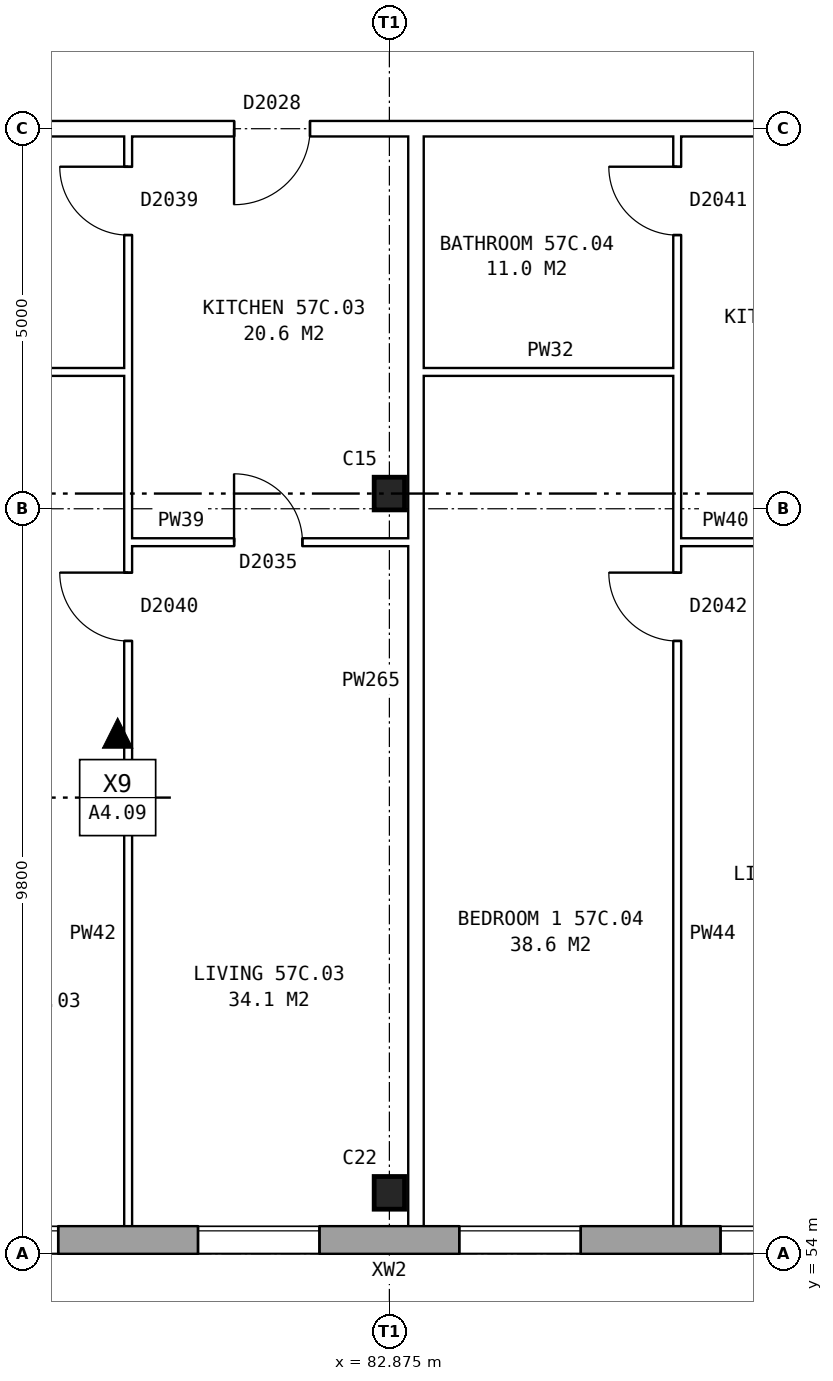
"""IFC4 building model, lengths in metres.
Left out: names, types, materials, properties, quantities, classifications, styles, units other than length and angle.
Written with IfcOpenShell. Run it as: python <this file> out.ifc"""

import sys

from ifc_helpers import new_model, si_unit, direction, frame, frame_2d, origin, origin_2d, place, context, subcontext, project, spatial, rectangle, i_section, extrude, element, fill, save


model = new_model("IFC4")
c1 = context("Model", 3, precision=1e-05, world=origin(), true_north=direction((0.0, 1.0)))
c2 = subcontext(c1, "Body", "Model", "MODEL_VIEW")
j1 = project(units=[si_unit("LENGTHUNIT", "METRE"), si_unit("PLANEANGLEUNIT", "RADIAN")], contexts=[c1])
p1 = place(None, origin())
s1 = spatial("IfcSite", under=j1, at=p1, CompositionType="ELEMENT")
p2 = place(p1, origin())
s2 = spatial("IfcBuilding", under=s1, at=p2, CompositionType="ELEMENT")
p3 = place(p2, frame((0.0, 0.0, 202.8)))
s3 = spatial("IfcBuildingStorey", under=s2, at=p3, CompositionType="ELEMENT", Elevation=202.8)
for number, where, z_axis, x_axis in (
    (1, (82.875, 54.8, 0.0), (0.0, 0.0, 1.0), (1.0, 0.0, 0.0)),
    (2, (82.875, 64.0, 0.0), (0.0, 0.0, 1.0), (1.0, 0.0, 0.0)),
):
    element("IfcColumn", number, at=place(p3, frame(where, z_axis=z_axis, x_axis=x_axis)), inside=s3, PredefinedType="COLUMN", context=c2, shape_type="SweptSolid", body=[
        extrude(i_section(OverallWidth=0.4, OverallDepth=0.43, WebThickness=0.04, FlangeThickness=0.04, at=origin_2d()), origin(), (0.0, 0.0, 1.0), 2.85),
    ])
p4 = place(p3, frame((75.95, 54.18, 0.0), z_axis=(0.0, 0.0, 1.0), x_axis=(1.0, 0.0, 0.0)))
e3 = element("IfcWall", 3, at=p4, inside=s3, PredefinedType="STANDARD", context=c2, shape_type="SweptSolid", body=[
    extrude(rectangle(XDim=55.1, YDim=0.36, at=frame_2d((27.55, 0.0))), origin(), (0.0, 0.0, 1.0), 2.85),
])
p5 = place(p4, frame((0.969, 0.0, 0.8)))
e4 = element("IfcOpeningElement", 4, at=p5, cuts=e3, PredefinedType="OPENING", context=c2, shape_type="SweptSolid", body=[
    extrude(rectangle(XDim=1.6, YDim=1.8, at=frame_2d((0.8, 0.9))), frame((0.0, 0.19, 0.0), z_axis=(0.0, -1.0, 0.0), x_axis=(1.0, 0.0, 0.0)), (0.0, 0.0, 1.0), 0.38),
])
p6 = place(p4, frame((4.406, 0.0, 0.8)))
e5 = element("IfcOpeningElement", 5, at=p6, cuts=e3, PredefinedType="OPENING", context=c2, shape_type="SweptSolid", body=[
    extrude(rectangle(XDim=1.6, YDim=1.8, at=frame_2d((0.8, 0.9))), frame((0.0, 0.19, 0.0), z_axis=(0.0, -1.0, 0.0), x_axis=(1.0, 0.0, 0.0)), (0.0, 0.0, 1.0), 0.38),
])
p7 = place(p4, frame((7.844, 0.0, 0.8)))
e6 = element("IfcOpeningElement", 6, at=p7, cuts=e3, PredefinedType="OPENING", context=c2, shape_type="SweptSolid", body=[
    extrude(rectangle(XDim=1.6, YDim=1.8, at=frame_2d((0.8, 0.9))), frame((0.0, 0.19, 0.0), z_axis=(0.0, -1.0, 0.0), x_axis=(1.0, 0.0, 0.0)), (0.0, 0.0, 1.0), 0.38),
])
p8 = place(p4, frame((11.281, 0.0, 0.8)))
e7 = element("IfcOpeningElement", 7, at=p8, cuts=e3, PredefinedType="OPENING", context=c2, shape_type="SweptSolid", body=[
    extrude(rectangle(XDim=1.6, YDim=1.8, at=frame_2d((0.8, 0.9))), frame((0.0, 0.19, 0.0), z_axis=(0.0, -1.0, 0.0), x_axis=(1.0, 0.0, 0.0)), (0.0, 0.0, 1.0), 0.38),
])
p9 = place(p4, frame((14.719, 0.0, 0.8)))
e8 = element("IfcOpeningElement", 8, at=p9, cuts=e3, PredefinedType="OPENING", context=c2, shape_type="SweptSolid", body=[
    extrude(rectangle(XDim=1.6, YDim=1.8, at=frame_2d((0.8, 0.9))), frame((0.0, 0.19, 0.0), z_axis=(0.0, -1.0, 0.0), x_axis=(1.0, 0.0, 0.0)), (0.0, 0.0, 1.0), 0.38),
])
p10 = place(p4, frame((18.156, 0.0, 0.8)))
e9 = element("IfcOpeningElement", 9, at=p10, cuts=e3, PredefinedType="OPENING", context=c2, shape_type="SweptSolid", body=[
    extrude(rectangle(XDim=1.6, YDim=1.8, at=frame_2d((0.8, 0.9))), frame((0.0, 0.19, 0.0), z_axis=(0.0, -1.0, 0.0), x_axis=(1.0, 0.0, 0.0)), (0.0, 0.0, 1.0), 0.38),
])
p11 = place(p4, frame((21.594, 0.0, 0.8)))
e10 = element("IfcOpeningElement", 10, at=p11, cuts=e3, PredefinedType="OPENING", context=c2, shape_type="SweptSolid", body=[
    extrude(rectangle(XDim=1.6, YDim=1.8, at=frame_2d((0.8, 0.9))), frame((0.0, 0.19, 0.0), z_axis=(0.0, -1.0, 0.0), x_axis=(1.0, 0.0, 0.0)), (0.0, 0.0, 1.0), 0.38),
])
p12 = place(p4, frame((25.031, 0.0, 0.8)))
e11 = element("IfcOpeningElement", 11, at=p12, cuts=e3, PredefinedType="OPENING", context=c2, shape_type="SweptSolid", body=[
    extrude(rectangle(XDim=1.6, YDim=1.8, at=frame_2d((0.8, 0.9))), frame((0.0, 0.19, 0.0), z_axis=(0.0, -1.0, 0.0), x_axis=(1.0, 0.0, 0.0)), (0.0, 0.0, 1.0), 0.38),
])
p13 = place(p4, frame((28.469, 0.0, 0.8)))
e12 = element("IfcOpeningElement", 12, at=p13, cuts=e3, PredefinedType="OPENING", context=c2, shape_type="SweptSolid", body=[
    extrude(rectangle(XDim=1.6, YDim=1.8, at=frame_2d((0.8, 0.9))), frame((0.0, 0.19, 0.0), z_axis=(0.0, -1.0, 0.0), x_axis=(1.0, 0.0, 0.0)), (0.0, 0.0, 1.0), 0.38),
])
p14 = place(p4, frame((31.906, 0.0, 0.8)))
e13 = element("IfcOpeningElement", 13, at=p14, cuts=e3, PredefinedType="OPENING", context=c2, shape_type="SweptSolid", body=[
    extrude(rectangle(XDim=1.6, YDim=1.8, at=frame_2d((0.8, 0.9))), frame((0.0, 0.19, 0.0), z_axis=(0.0, -1.0, 0.0), x_axis=(1.0, 0.0, 0.0)), (0.0, 0.0, 1.0), 0.38),
])
p15 = place(p4, frame((35.344, 0.0, 0.8)))
e14 = element("IfcOpeningElement", 14, at=p15, cuts=e3, PredefinedType="OPENING", context=c2, shape_type="SweptSolid", body=[
    extrude(rectangle(XDim=1.6, YDim=1.8, at=frame_2d((0.8, 0.9))), frame((0.0, 0.19, 0.0), z_axis=(0.0, -1.0, 0.0), x_axis=(1.0, 0.0, 0.0)), (0.0, 0.0, 1.0), 0.38),
])
p16 = place(p4, frame((38.781, 0.0, 0.8)))
e15 = element("IfcOpeningElement", 15, at=p16, cuts=e3, PredefinedType="OPENING", context=c2, shape_type="SweptSolid", body=[
    extrude(rectangle(XDim=1.6, YDim=1.8, at=frame_2d((0.8, 0.9))), frame((0.0, 0.19, 0.0), z_axis=(0.0, -1.0, 0.0), x_axis=(1.0, 0.0, 0.0)), (0.0, 0.0, 1.0), 0.38),
])
p17 = place(p4, frame((42.219, 0.0, 0.8)))
e16 = element("IfcOpeningElement", 16, at=p17, cuts=e3, PredefinedType="OPENING", context=c2, shape_type="SweptSolid", body=[
    extrude(rectangle(XDim=1.6, YDim=1.8, at=frame_2d((0.8, 0.9))), frame((0.0, 0.19, 0.0), z_axis=(0.0, -1.0, 0.0), x_axis=(1.0, 0.0, 0.0)), (0.0, 0.0, 1.0), 0.38),
])
p18 = place(p4, frame((45.656, 0.0, 0.8)))
e17 = element("IfcOpeningElement", 17, at=p18, cuts=e3, PredefinedType="OPENING", context=c2, shape_type="SweptSolid", body=[
    extrude(rectangle(XDim=1.6, YDim=1.8, at=frame_2d((0.8, 0.9))), frame((0.0, 0.19, 0.0), z_axis=(0.0, -1.0, 0.0), x_axis=(1.0, 0.0, 0.0)), (0.0, 0.0, 1.0), 0.38),
])
p19 = place(p4, frame((49.094, 0.0, 0.8)))
e18 = element("IfcOpeningElement", 18, at=p19, cuts=e3, PredefinedType="OPENING", context=c2, shape_type="SweptSolid", body=[
    extrude(rectangle(XDim=1.6, YDim=1.8, at=frame_2d((0.8, 0.9))), frame((0.0, 0.19, 0.0), z_axis=(0.0, -1.0, 0.0), x_axis=(1.0, 0.0, 0.0)), (0.0, 0.0, 1.0), 0.38),
])
p20 = place(p4, frame((52.531, 0.0, 0.8)))
e19 = element("IfcOpeningElement", 19, at=p20, cuts=e3, PredefinedType="OPENING", context=c2, shape_type="SweptSolid", body=[
    extrude(rectangle(XDim=1.6, YDim=1.8, at=frame_2d((0.8, 0.9))), frame((0.0, 0.19, 0.0), z_axis=(0.0, -1.0, 0.0), x_axis=(1.0, 0.0, 0.0)), (0.0, 0.0, 1.0), 0.38),
])
p21 = place(p3, frame((79.438, 63.36, 0.0), z_axis=(0.0, 0.0, 1.0), x_axis=(1.0, 0.0, 0.0)))
e20 = element("IfcWall", 20, at=p21, inside=s3, PredefinedType="PARTITIONING", context=c2, shape_type="SweptSolid", body=[
    extrude(rectangle(XDim=3.687, YDim=0.1, at=frame_2d((1.844, 0.0))), origin(), (0.0, 0.0, 1.0), 2.85),
])
p22 = place(p21, frame((1.394, 0.0, 0.0)))
e21 = element("IfcOpeningElement", 21, at=p22, cuts=e20, PredefinedType="OPENING", context=c2, shape_type="SweptSolid", body=[
    extrude(rectangle(XDim=0.9, YDim=2.1, at=frame_2d((0.45, 1.05))), frame((0.0, 0.06, 0.0), z_axis=(0.0, -1.0, 0.0), x_axis=(1.0, 0.0, 0.0)), (0.0, 0.0, 1.0), 0.12),
])
p23 = place(p3, frame((86.662, 63.36, 0.0), z_axis=(0.0, 0.0, 1.0), x_axis=(1.0, 0.0, 0.0)))
e22 = element("IfcWall", 22, at=p23, inside=s3, PredefinedType="PARTITIONING", context=c2, shape_type="SweptSolid", body=[
    extrude(rectangle(XDim=3.438, YDim=0.1, at=frame_2d((1.719, 0.0))), origin(), (0.0, 0.0, 1.0), 2.85),
])
p24 = place(p23, frame((1.269, 0.0, 0.0)))
e23 = element("IfcOpeningElement", 23, at=p24, cuts=e22, PredefinedType="OPENING", context=c2, shape_type="SweptSolid", body=[
    extrude(rectangle(XDim=0.9, YDim=2.1, at=frame_2d((0.45, 1.05))), frame((0.0, 0.06, 0.0), z_axis=(0.0, -1.0, 0.0), x_axis=(1.0, 0.0, 0.0)), (0.0, 0.0, 1.0), 0.12),
])
p25 = place(p3, frame((75.64, 65.6, 0.0), z_axis=(0.0, 0.0, 1.0), x_axis=(1.0, 0.0, 0.0)))
e24 = element("IfcWall", 24, at=p25, inside=s3, PredefinedType="PARTITIONING", context=c2, shape_type="SweptSolid", body=[
    extrude(rectangle(XDim=3.798, YDim=0.1, at=frame_2d((1.899, 0.0))), origin(), (0.0, 0.0, 1.0), 2.85),
])
p26 = place(p3, frame((83.325, 65.6, 0.0), z_axis=(0.0, 0.0, 1.0), x_axis=(1.0, 0.0, 0.0)))
e25 = element("IfcWall", 25, at=p26, inside=s3, PredefinedType="PARTITIONING", context=c2, shape_type="SweptSolid", body=[
    extrude(rectangle(XDim=3.337, YDim=0.1, at=frame_2d((1.668, 0.0))), origin(), (0.0, 0.0, 1.0), 2.85),
])
p27 = place(p3, frame((75.64, 68.8, 0.0), z_axis=(0.0, 0.0, 1.0), x_axis=(1.0, 0.0, 0.0)))
e26 = element("IfcWall", 26, at=p27, inside=s3, PredefinedType="PARTITIONING", context=c2, shape_type="SweptSolid", body=[
    extrude(rectangle(XDim=55.72, YDim=0.2, at=frame_2d((27.86, 0.0))), origin(), (0.0, 0.0, 1.0), 2.85),
])
p28 = place(p27, frame((5.191, 0.0, 0.0)))
e27 = element("IfcOpeningElement", 27, at=p28, cuts=e26, PredefinedType="OPENING", context=c2, shape_type="SweptSolid", body=[
    extrude(rectangle(XDim=1.0, YDim=2.1, at=frame_2d((0.5, 1.05))), frame((0.0, 0.11, 0.0), z_axis=(0.0, -1.0, 0.0), x_axis=(1.0, 0.0, 0.0)), (0.0, 0.0, 1.0), 0.22),
])
p29 = place(p27, frame((12.241, 0.0, 0.0)))
e28 = element("IfcOpeningElement", 28, at=p29, cuts=e26, PredefinedType="OPENING", context=c2, shape_type="SweptSolid", body=[
    extrude(rectangle(XDim=1.0, YDim=2.1, at=frame_2d((0.5, 1.05))), frame((0.0, 0.11, 0.0), z_axis=(0.0, -1.0, 0.0), x_axis=(1.0, 0.0, 0.0)), (0.0, 0.0, 1.0), 0.22),
])
p30 = place(p27, frame((22.553, 0.0, 0.0)))
e29 = element("IfcOpeningElement", 29, at=p30, cuts=e26, PredefinedType="OPENING", context=c2, shape_type="SweptSolid", body=[
    extrude(rectangle(XDim=1.0, YDim=2.1, at=frame_2d((0.5, 1.05))), frame((0.0, 0.11, 0.0), z_axis=(0.0, -1.0, 0.0), x_axis=(1.0, 0.0, 0.0)), (0.0, 0.0, 1.0), 0.22),
])
p31 = place(p27, frame((32.866, 0.0, 0.0)))
e30 = element("IfcOpeningElement", 30, at=p31, cuts=e26, PredefinedType="OPENING", context=c2, shape_type="SweptSolid", body=[
    extrude(rectangle(XDim=1.0, YDim=2.1, at=frame_2d((0.5, 1.05))), frame((0.0, 0.11, 0.0), z_axis=(0.0, -1.0, 0.0), x_axis=(1.0, 0.0, 0.0)), (0.0, 0.0, 1.0), 0.22),
])
p32 = place(p27, frame((36.303, 0.0, 0.0)))
e31 = element("IfcOpeningElement", 31, at=p32, cuts=e26, PredefinedType="OPENING", context=c2, shape_type="SweptSolid", body=[
    extrude(rectangle(XDim=1.0, YDim=2.1, at=frame_2d((0.5, 1.05))), frame((0.0, 0.11, 0.0), z_axis=(0.0, -1.0, 0.0), x_axis=(1.0, 0.0, 0.0)), (0.0, 0.0, 1.0), 0.22),
])
p33 = place(p27, frame((43.178, 0.0, 0.0)))
e32 = element("IfcOpeningElement", 32, at=p33, cuts=e26, PredefinedType="OPENING", context=c2, shape_type="SweptSolid", body=[
    extrude(rectangle(XDim=1.0, YDim=2.1, at=frame_2d((0.5, 1.05))), frame((0.0, 0.11, 0.0), z_axis=(0.0, -1.0, 0.0), x_axis=(1.0, 0.0, 0.0)), (0.0, 0.0, 1.0), 0.22),
])
p34 = place(p27, frame((50.053, 0.0, 0.0)))
e33 = element("IfcOpeningElement", 33, at=p34, cuts=e26, PredefinedType="OPENING", context=c2, shape_type="SweptSolid", body=[
    extrude(rectangle(XDim=1.0, YDim=2.1, at=frame_2d((0.5, 1.05))), frame((0.0, 0.11, 0.0), z_axis=(0.0, -1.0, 0.0), x_axis=(1.0, 0.0, 0.0)), (0.0, 0.0, 1.0), 0.22),
])
p35 = place(p3, frame((79.438, 54.36, 0.0), z_axis=(0.0, 0.0, 1.0), x_axis=(0.0, 1.0, 0.0)))
e34 = element("IfcWall", 34, at=p35, inside=s3, PredefinedType="PARTITIONING", context=c2, shape_type="SweptSolid", body=[
    extrude(rectangle(XDim=14.34, YDim=0.1, at=frame_2d((7.17, 0.0))), origin(), (0.0, 0.0, 1.0), 2.85),
])
p36 = place(p35, frame((7.7, 0.0, 0.0)))
e35 = element("IfcOpeningElement", 35, at=p36, cuts=e34, PredefinedType="OPENING", context=c2, shape_type="SweptSolid", body=[
    extrude(rectangle(XDim=0.9, YDim=2.1, at=frame_2d((0.45, 1.05))), frame((0.0, 0.06, 0.0), z_axis=(0.0, -1.0, 0.0), x_axis=(1.0, 0.0, 0.0)), (0.0, 0.0, 1.0), 0.12),
])
p37 = place(p35, frame((13.04, 0.0, 0.0)))
e36 = element("IfcOpeningElement", 36, at=p37, cuts=e34, PredefinedType="OPENING", context=c2, shape_type="SweptSolid", body=[
    extrude(rectangle(XDim=0.9, YDim=2.1, at=frame_2d((0.45, 1.05))), frame((0.0, 0.06, 0.0), z_axis=(0.0, -1.0, 0.0), x_axis=(1.0, 0.0, 0.0)), (0.0, 0.0, 1.0), 0.12),
])
p38 = place(p3, frame((83.225, 54.36, 0.0), z_axis=(0.0, 0.0, 1.0), x_axis=(0.0, 1.0, 0.0)))
e37 = element("IfcWall", 37, at=p38, inside=s3, PredefinedType="PARTITIONING", context=c2, shape_type="SweptSolid", body=[
    extrude(rectangle(XDim=14.34, YDim=0.2, at=frame_2d((7.17, 0.0))), origin(), (0.0, 0.0, 1.0), 2.85),
])
p39 = place(p3, frame((86.662, 54.36, 0.0), z_axis=(0.0, 0.0, 1.0), x_axis=(0.0, 1.0, 0.0)))
e38 = element("IfcWall", 38, at=p39, inside=s3, PredefinedType="PARTITIONING", context=c2, shape_type="SweptSolid", body=[
    extrude(rectangle(XDim=14.34, YDim=0.1, at=frame_2d((7.17, 0.0))), origin(), (0.0, 0.0, 1.0), 2.85),
])
p40 = place(p39, frame((7.7, 0.0, 0.0)))
e39 = element("IfcOpeningElement", 39, at=p40, cuts=e38, PredefinedType="OPENING", context=c2, shape_type="SweptSolid", body=[
    extrude(rectangle(XDim=0.9, YDim=2.1, at=frame_2d((0.45, 1.05))), frame((0.0, 0.06, 0.0), z_axis=(0.0, -1.0, 0.0), x_axis=(1.0, 0.0, 0.0)), (0.0, 0.0, 1.0), 0.12),
])
p41 = place(p39, frame((13.04, 0.0, 0.0)))
e40 = element("IfcOpeningElement", 40, at=p41, cuts=e38, PredefinedType="OPENING", context=c2, shape_type="SweptSolid", body=[
    extrude(rectangle(XDim=0.9, YDim=2.1, at=frame_2d((0.45, 1.05))), frame((0.0, 0.06, 0.0), z_axis=(0.0, -1.0, 0.0), x_axis=(1.0, 0.0, 0.0)), (0.0, 0.0, 1.0), 0.12),
])
p42 = place(p5, origin())
e41 = element("IfcWindow", 41, at=p42, inside=s3, PartitioningType="SINGLE_PANEL", PredefinedType="WINDOW", context=c2, shape_type="SweptSolid", body=[
    extrude(rectangle(XDim=1.6, YDim=1.8, at=frame_2d((0.8, 0.9))), frame((0.0, 0.15, 0.0), z_axis=(0.0, -1.0, 0.0), x_axis=(1.0, 0.0, 0.0)), (0.0, 0.0, 1.0), 0.06),
])
fill(e4, e41)
p43 = place(p6, origin())
e42 = element("IfcWindow", 42, at=p43, inside=s3, PartitioningType="SINGLE_PANEL", PredefinedType="WINDOW", context=c2, shape_type="SweptSolid", body=[
    extrude(rectangle(XDim=1.6, YDim=1.8, at=frame_2d((0.8, 0.9))), frame((0.0, 0.15, 0.0), z_axis=(0.0, -1.0, 0.0), x_axis=(1.0, 0.0, 0.0)), (0.0, 0.0, 1.0), 0.06),
])
fill(e5, e42)
p44 = place(p7, origin())
e43 = element("IfcWindow", 43, at=p44, inside=s3, PartitioningType="SINGLE_PANEL", PredefinedType="WINDOW", context=c2, shape_type="SweptSolid", body=[
    extrude(rectangle(XDim=1.6, YDim=1.8, at=frame_2d((0.8, 0.9))), frame((0.0, 0.15, 0.0), z_axis=(0.0, -1.0, 0.0), x_axis=(1.0, 0.0, 0.0)), (0.0, 0.0, 1.0), 0.06),
])
fill(e6, e43)
p45 = place(p8, origin())
e44 = element("IfcWindow", 44, at=p45, inside=s3, PartitioningType="SINGLE_PANEL", PredefinedType="WINDOW", context=c2, shape_type="SweptSolid", body=[
    extrude(rectangle(XDim=1.6, YDim=1.8, at=frame_2d((0.8, 0.9))), frame((0.0, 0.15, 0.0), z_axis=(0.0, -1.0, 0.0), x_axis=(1.0, 0.0, 0.0)), (0.0, 0.0, 1.0), 0.06),
])
fill(e7, e44)
p46 = place(p36, origin())
e45 = element("IfcDoor", 45, at=p46, inside=s3, OperationType="SINGLE_SWING_RIGHT", PredefinedType="DOOR", context=c2, shape_type="SweptSolid", body=[
    extrude(rectangle(XDim=0.9, YDim=2.1, at=frame_2d((0.45, 1.05))), frame((0.0, 0.025, 0.0), z_axis=(0.0, -1.0, 0.0), x_axis=(1.0, 0.0, 0.0)), (0.0, 0.0, 1.0), 0.05),
])
fill(e35, e45)
p47 = place(p28, frame((1.0, 0.0, 0.0), z_axis=(0.0, 0.0, 1.0), x_axis=(-1.0, 0.0, 0.0)))
e46 = element("IfcDoor", 46, at=p47, inside=s3, OperationType="SINGLE_SWING_RIGHT", PredefinedType="DOOR", context=c2, shape_type="SweptSolid", body=[
    extrude(rectangle(XDim=1.0, YDim=2.1, at=frame_2d((0.5, 1.05))), frame((0.0, 0.025, 0.0), z_axis=(0.0, -1.0, 0.0), x_axis=(1.0, 0.0, 0.0)), (0.0, 0.0, 1.0), 0.05),
])
fill(e27, e46)
p48 = place(p22, origin())
e47 = element("IfcDoor", 47, at=p48, inside=s3, OperationType="SINGLE_SWING_LEFT", PredefinedType="DOOR", context=c2, shape_type="SweptSolid", body=[
    extrude(rectangle(XDim=0.9, YDim=2.1, at=frame_2d((0.45, 1.05))), frame((0.0, 0.025, 0.0), z_axis=(0.0, -1.0, 0.0), x_axis=(1.0, 0.0, 0.0)), (0.0, 0.0, 1.0), 0.05),
])
fill(e21, e47)
p49 = place(p37, origin())
e48 = element("IfcDoor", 48, at=p49, inside=s3, OperationType="SINGLE_SWING_RIGHT", PredefinedType="DOOR", context=c2, shape_type="SweptSolid", body=[
    extrude(rectangle(XDim=0.9, YDim=2.1, at=frame_2d((0.45, 1.05))), frame((0.0, 0.025, 0.0), z_axis=(0.0, -1.0, 0.0), x_axis=(1.0, 0.0, 0.0)), (0.0, 0.0, 1.0), 0.05),
])
fill(e36, e48)
p50 = place(p40, origin())
e49 = element("IfcDoor", 49, at=p50, inside=s3, OperationType="SINGLE_SWING_RIGHT", PredefinedType="DOOR", context=c2, shape_type="SweptSolid", body=[
    extrude(rectangle(XDim=0.9, YDim=2.1, at=frame_2d((0.45, 1.05))), frame((0.0, 0.025, 0.0), z_axis=(0.0, -1.0, 0.0), x_axis=(1.0, 0.0, 0.0)), (0.0, 0.0, 1.0), 0.05),
])
fill(e39, e49)
p51 = place(p41, origin())
e50 = element("IfcDoor", 50, at=p51, inside=s3, OperationType="SINGLE_SWING_RIGHT", PredefinedType="DOOR", context=c2, shape_type="SweptSolid", body=[
    extrude(rectangle(XDim=0.9, YDim=2.1, at=frame_2d((0.45, 1.05))), frame((0.0, 0.025, 0.0), z_axis=(0.0, -1.0, 0.0), x_axis=(1.0, 0.0, 0.0)), (0.0, 0.0, 1.0), 0.05),
])
fill(e40, e50)
save(model, sys.argv[1])
